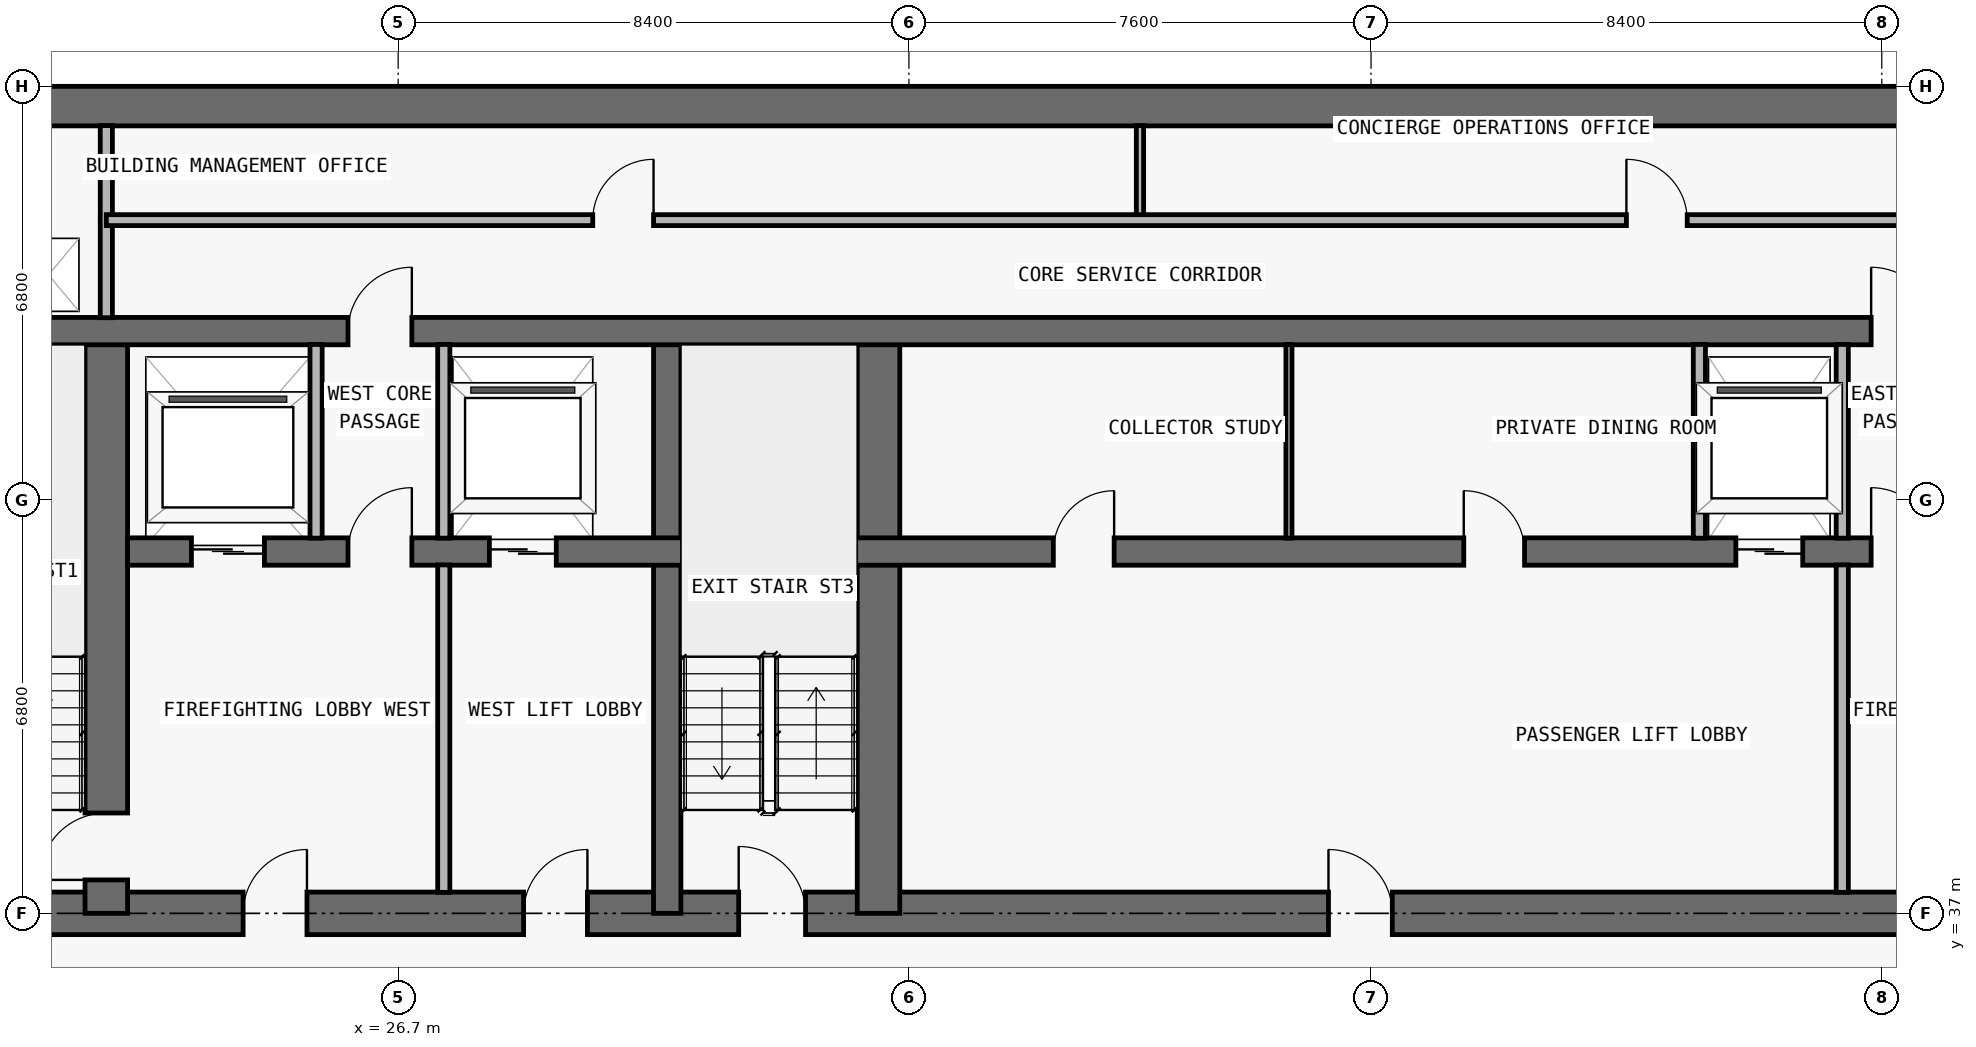
"""IFC4 building model, lengths in metres.
Left out: names, types, materials, properties, quantities, classifications, styles, units other than length and angle.
Written with IfcOpenShell. Run it as: python <this file> out.ifc"""

import sys

from ifc_helpers import new_model, si_unit, direction, frame, frame_2d, origin, place, context, subcontext, project, spatial, rectangle, extrude, element, fill, save


model = new_model("IFC4")
c1 = context("Model", 3, precision=1e-05, world=origin(), true_north=direction((0.0, 1.0)))
c2 = subcontext(c1, "Body", "Model", "MODEL_VIEW")
j1 = project(units=[si_unit("LENGTHUNIT", "METRE"), si_unit("PLANEANGLEUNIT", "RADIAN")], contexts=[c1])
p1 = place(None, origin())
s1 = spatial("IfcSite", under=j1, at=p1, CompositionType="ELEMENT")
p2 = place(p1, origin())
s2 = spatial("IfcBuilding", under=s1, at=p2, CompositionType="ELEMENT")
p3 = place(p2, frame((0.0, 0.0, 198.3)))
s3 = spatial("IfcBuildingStorey", under=s2, at=p3, CompositionType="ELEMENT", Elevation=198.3)
p4 = place(p3, frame((17.95, 37.0, 0.0), z_axis=(0.0, 0.0, 1.0), x_axis=(1.0, 0.0, 0.0)))
e1 = element("IfcWall", 1, at=p4, inside=s3, PredefinedType="SHEAR", context=c2, shape_type="SweptSolid", body=[
    extrude(rectangle(XDim=41.9, YDim=0.7, at=frame_2d((20.95, 0.0))), origin(), (0.0, 0.0, 1.0), 3.05),
])
p5 = place(p4, frame((14.35, 0.0, 0.0)))
e2 = element("IfcOpeningElement", 2, at=p5, cuts=e1, PredefinedType="OPENING", context=c2, shape_type="SweptSolid", body=[
    extrude(rectangle(XDim=1.1, YDim=2.15, at=frame_2d((0.55, 1.075))), frame((0.0, 0.36, 0.0), z_axis=(0.0, -1.0, 0.0), x_axis=(1.0, 0.0, 0.0)), (0.0, 0.0, 1.0), 0.72),
])
p6 = place(p4, frame((6.2, 0.0, 0.0)))
e3 = element("IfcOpeningElement", 3, at=p6, cuts=e1, PredefinedType="OPENING", context=c2, shape_type="SweptSolid", body=[
    extrude(rectangle(XDim=1.05, YDim=2.15, at=frame_2d((0.525, 1.075))), frame((0.0, 0.36, 0.0), z_axis=(0.0, -1.0, 0.0), x_axis=(1.0, 0.0, 0.0)), (0.0, 0.0, 1.0), 0.72),
])
p7 = place(p4, frame((34.7, 0.0, 0.0)))
e4 = element("IfcOpeningElement", 4, at=p7, cuts=e1, PredefinedType="OPENING", context=c2, shape_type="SweptSolid", body=[
    extrude(rectangle(XDim=1.05, YDim=2.15, at=frame_2d((0.525, 1.075))), frame((0.0, 0.36, 0.0), z_axis=(0.0, -1.0, 0.0), x_axis=(1.0, 0.0, 0.0)), (0.0, 0.0, 1.0), 0.72),
])
p8 = place(p4, frame((10.812, 0.0, 0.0)))
e5 = element("IfcOpeningElement", 5, at=p8, cuts=e1, PredefinedType="OPENING", context=c2, shape_type="SweptSolid", body=[
    extrude(rectangle(XDim=1.05, YDim=2.15, at=frame_2d((0.525, 1.075))), frame((0.0, 0.36, 0.0), z_axis=(0.0, -1.0, 0.0), x_axis=(1.0, 0.0, 0.0)), (0.0, 0.0, 1.0), 0.72),
])
p9 = place(p4, frame((24.05, 0.0, 0.0)))
e6 = element("IfcOpeningElement", 6, at=p9, cuts=e1, PredefinedType="OPENING", context=c2, shape_type="SweptSolid", body=[
    extrude(rectangle(XDim=1.05, YDim=2.15, at=frame_2d((0.525, 1.075))), frame((0.0, 0.36, 0.0), z_axis=(0.0, -1.0, 0.0), x_axis=(1.0, 0.0, 0.0)), (0.0, 0.0, 1.0), 0.72),
])
p10 = place(p3, frame((17.95, 50.275, 0.0), z_axis=(0.0, 0.0, 1.0), x_axis=(1.0, 0.0, 0.0)))
e7 = element("IfcWall", 7, at=p10, inside=s3, PredefinedType="SHEAR", context=c2, shape_type="SweptSolid", body=[
    extrude(rectangle(XDim=41.9, YDim=0.65, at=frame_2d((20.95, 0.0))), origin(), (0.0, 0.0, 1.0), 3.05),
])
p11 = place(p3, frame((21.9, 37.0, 0.0), z_axis=(0.0, 0.0, 1.0), x_axis=(0.0, 1.0, 0.0)))
e8 = element("IfcWall", 8, at=p11, inside=s3, PredefinedType="SHEAR", context=c2, shape_type="SweptSolid", body=[
    extrude(rectangle(XDim=9.575, YDim=0.7, at=frame_2d((4.788, 0.0))), origin(), (0.0, 0.0, 1.0), 3.05),
])
p12 = place(p11, frame((0.55, 0.0, 0.0)))
e9 = element("IfcOpeningElement", 9, at=p12, cuts=e8, PredefinedType="OPENING", context=c2, shape_type="SweptSolid", body=[
    extrude(rectangle(XDim=1.1, YDim=2.15, at=frame_2d((0.55, 1.075))), frame((0.0, 0.36, 0.0), z_axis=(0.0, -1.0, 0.0), x_axis=(1.0, 0.0, 0.0)), (0.0, 0.0, 1.0), 0.72),
])
p13 = place(p3, frame((31.125, 37.0, 0.0), z_axis=(0.0, 0.0, 1.0), x_axis=(0.0, 1.0, 0.0)))
e10 = element("IfcWall", 10, at=p13, inside=s3, PredefinedType="SHEAR", context=c2, shape_type="SweptSolid", body=[
    extrude(rectangle(XDim=9.575, YDim=0.45, at=frame_2d((4.788, 0.0))), origin(), (0.0, 0.0, 1.0), 3.05),
])
p14 = place(p3, frame((34.6, 37.0, 0.0), z_axis=(0.0, 0.0, 1.0), x_axis=(0.0, 1.0, 0.0)))
e11 = element("IfcWall", 11, at=p14, inside=s3, PredefinedType="SHEAR", context=c2, shape_type="SweptSolid", body=[
    extrude(rectangle(XDim=9.575, YDim=0.7, at=frame_2d((4.788, 0.0))), origin(), (0.0, 0.0, 1.0), 3.05),
])
p15 = place(p3, frame((22.25, 42.95, 0.0), z_axis=(0.0, 0.0, 1.0), x_axis=(1.0, 0.0, 0.0)))
e12 = element("IfcWall", 12, at=p15, inside=s3, PredefinedType="SHEAR", context=c2, shape_type="SweptSolid", body=[
    extrude(rectangle(XDim=33.3, YDim=0.45, at=frame_2d((16.65, 0.0))), origin(), (0.0, 0.0, 1.0), 3.05),
])
p16 = place(p15, frame((1.05, 0.0, 0.0)))
e13 = element("IfcOpeningElement", 13, at=p16, cuts=e12, PredefinedType="OPENING", context=c2, shape_type="SweptSolid", body=[
    extrude(rectangle(XDim=1.2, YDim=2.2, at=frame_2d((0.6, 1.1))), frame((0.0, 0.235, 0.0), z_axis=(0.0, -1.0, 0.0), x_axis=(1.0, 0.0, 0.0)), (0.0, 0.0, 1.0), 0.47),
])
p17 = place(p15, frame((31.05, 0.0, 0.0)))
e14 = element("IfcOpeningElement", 14, at=p17, cuts=e12, PredefinedType="OPENING", context=c2, shape_type="SweptSolid", body=[
    extrude(rectangle(XDim=1.2, YDim=2.2, at=frame_2d((0.6, 1.1))), frame((0.0, 0.235, 0.0), z_axis=(0.0, -1.0, 0.0), x_axis=(1.0, 0.0, 0.0)), (0.0, 0.0, 1.0), 0.47),
])
p18 = place(p15, frame((26.45, 0.0, 0.0)))
e15 = element("IfcOpeningElement", 15, at=p18, cuts=e12, PredefinedType="OPENING", context=c2, shape_type="SweptSolid", body=[
    extrude(rectangle(XDim=1.1, YDim=2.2, at=frame_2d((0.55, 1.1))), frame((0.0, 0.235, 0.0), z_axis=(0.0, -1.0, 0.0), x_axis=(1.0, 0.0, 0.0)), (0.0, 0.0, 1.0), 0.47),
])
p19 = place(p15, frame((5.95, 0.0, 0.0)))
e16 = element("IfcOpeningElement", 16, at=p19, cuts=e12, PredefinedType="OPENING", context=c2, shape_type="SweptSolid", body=[
    extrude(rectangle(XDim=1.1, YDim=2.2, at=frame_2d((0.55, 1.1))), frame((0.0, 0.235, 0.0), z_axis=(0.0, -1.0, 0.0), x_axis=(1.0, 0.0, 0.0)), (0.0, 0.0, 1.0), 0.47),
])
p20 = place(p15, frame((3.625, 0.0, 0.0)))
e17 = element("IfcOpeningElement", 17, at=p20, cuts=e12, PredefinedType="OPENING", context=c2, shape_type="SweptSolid", body=[
    extrude(rectangle(XDim=1.05, YDim=2.15, at=frame_2d((0.525, 1.075))), frame((0.0, 0.235, 0.0), z_axis=(0.0, -1.0, 0.0), x_axis=(1.0, 0.0, 0.0)), (0.0, 0.0, 1.0), 0.47),
])
p21 = place(p15, frame((28.675, 0.0, 0.0)))
e18 = element("IfcOpeningElement", 18, at=p21, cuts=e12, PredefinedType="OPENING", context=c2, shape_type="SweptSolid", body=[
    extrude(rectangle(XDim=1.05, YDim=2.15, at=frame_2d((0.525, 1.075))), frame((0.0, 0.235, 0.0), z_axis=(0.0, -1.0, 0.0), x_axis=(1.0, 0.0, 0.0)), (0.0, 0.0, 1.0), 0.47),
])
p22 = place(p15, frame((15.225, 0.0, 0.0)))
e19 = element("IfcOpeningElement", 19, at=p22, cuts=e12, PredefinedType="OPENING", context=c2, shape_type="SweptSolid", body=[
    extrude(rectangle(XDim=1.0, YDim=2.2, at=frame_2d((0.5, 1.1))), frame((0.0, 0.235, 0.0), z_axis=(0.0, -1.0, 0.0), x_axis=(1.0, 0.0, 0.0)), (0.0, 0.0, 1.0), 0.47),
])
p23 = place(p15, frame((21.975, 0.0, 0.0)))
e20 = element("IfcOpeningElement", 20, at=p23, cuts=e12, PredefinedType="OPENING", context=c2, shape_type="SweptSolid", body=[
    extrude(rectangle(XDim=1.0, YDim=2.2, at=frame_2d((0.5, 1.1))), frame((0.0, 0.235, 0.0), z_axis=(0.0, -1.0, 0.0), x_axis=(1.0, 0.0, 0.0)), (0.0, 0.0, 1.0), 0.47),
])
p24 = place(p3, frame((18.3, 46.575, 0.0), z_axis=(0.0, 0.0, 1.0), x_axis=(1.0, 0.0, 0.0)))
e21 = element("IfcWall", 21, at=p24, inside=s3, PredefinedType="SHEAR", context=c2, shape_type="SweptSolid", body=[
    extrude(rectangle(XDim=41.2, YDim=0.45, at=frame_2d((20.6, 0.0))), origin(), (0.0, 0.0, 1.0), 3.05),
])
p25 = place(p24, frame((7.575, 0.0, 0.0)))
e22 = element("IfcOpeningElement", 22, at=p25, cuts=e21, PredefinedType="OPENING", context=c2, shape_type="SweptSolid", body=[
    extrude(rectangle(XDim=1.05, YDim=2.15, at=frame_2d((0.525, 1.075))), frame((0.0, 0.235, 0.0), z_axis=(0.0, -1.0, 0.0), x_axis=(1.0, 0.0, 0.0)), (0.0, 0.0, 1.0), 0.47),
])
p26 = place(p24, frame((32.625, 0.0, 0.0)))
e23 = element("IfcOpeningElement", 23, at=p26, cuts=e21, PredefinedType="OPENING", context=c2, shape_type="SweptSolid", body=[
    extrude(rectangle(XDim=1.05, YDim=2.15, at=frame_2d((0.525, 1.075))), frame((0.0, 0.235, 0.0), z_axis=(0.0, -1.0, 0.0), x_axis=(1.0, 0.0, 0.0)), (0.0, 0.0, 1.0), 0.47),
])
p27 = place(p3, frame((21.9, 46.795, 0.0), z_axis=(0.0, 0.0, 1.0), x_axis=(0.0, 1.0, 0.0)))
e24 = element("IfcWall", 24, at=p27, inside=s3, PredefinedType="PARTITIONING", context=c2, shape_type="SweptSolid", body=[
    extrude(rectangle(XDim=3.16, YDim=0.2, at=frame_2d((1.58, 0.0))), origin(), (0.0, 0.0, 1.0), 3.05),
])
p28 = place(p3, frame((25.35, 43.17, 0.0), z_axis=(0.0, 0.0, 1.0), x_axis=(0.0, 1.0, 0.0)))
e25 = element("IfcWall", 25, at=p28, inside=s3, PredefinedType="PARTITIONING", context=c2, shape_type="SweptSolid", body=[
    extrude(rectangle(XDim=3.185, YDim=0.2, at=frame_2d((1.593, 0.0))), origin(), (0.0, 0.0, 1.0), 3.05),
])
p29 = place(p3, frame((27.45, 37.345, 0.0), z_axis=(0.0, 0.0, 1.0), x_axis=(0.0, 1.0, 0.0)))
e26 = element("IfcWall", 26, at=p29, inside=s3, PredefinedType="PARTITIONING", context=c2, shape_type="SweptSolid", body=[
    extrude(rectangle(XDim=5.385, YDim=0.2, at=frame_2d((2.692, 0.0))), origin(), (0.0, 0.0, 1.0), 3.05),
])
p30 = place(p3, frame((27.45, 43.17, 0.0), z_axis=(0.0, 0.0, 1.0), x_axis=(0.0, 1.0, 0.0)))
e27 = element("IfcWall", 27, at=p30, inside=s3, PredefinedType="PARTITIONING", context=c2, shape_type="SweptSolid", body=[
    extrude(rectangle(XDim=3.185, YDim=0.2, at=frame_2d((1.593, 0.0))), origin(), (0.0, 0.0, 1.0), 3.05),
])
p31 = place(p3, frame((38.9, 48.4, 0.0), z_axis=(0.0, 0.0, 1.0), x_axis=(0.0, 1.0, 0.0)))
e28 = element("IfcWall", 28, at=p31, inside=s3, PredefinedType="PARTITIONING", context=c2, shape_type="SweptSolid", body=[
    extrude(rectangle(XDim=1.555, YDim=0.12, at=frame_2d((0.778, 0.0))), origin(), (0.0, 0.0, 1.0), 3.05),
])
p32 = place(p3, frame((41.35, 43.17, 0.0), z_axis=(0.0, 0.0, 1.0), x_axis=(0.0, 1.0, 0.0)))
e29 = element("IfcWall", 29, at=p32, inside=s3, PredefinedType="MOVABLE", context=c2, shape_type="SweptSolid", body=[
    extrude(rectangle(XDim=3.185, YDim=0.1, at=frame_2d((1.593, 0.0))), origin(), (0.0, 0.0, 1.0), 3.05),
])
p33 = place(p3, frame((48.1, 43.17, 0.0), z_axis=(0.0, 0.0, 1.0), x_axis=(0.0, 1.0, 0.0)))
e30 = element("IfcWall", 30, at=p33, inside=s3, PredefinedType="PARTITIONING", context=c2, shape_type="SweptSolid", body=[
    extrude(rectangle(XDim=3.185, YDim=0.2, at=frame_2d((1.593, 0.0))), origin(), (0.0, 0.0, 1.0), 3.05),
])
p34 = place(p3, frame((50.45, 37.345, 0.0), z_axis=(0.0, 0.0, 1.0), x_axis=(0.0, 1.0, 0.0)))
e31 = element("IfcWall", 31, at=p34, inside=s3, PredefinedType="PARTITIONING", context=c2, shape_type="SweptSolid", body=[
    extrude(rectangle(XDim=5.385, YDim=0.2, at=frame_2d((2.692, 0.0))), origin(), (0.0, 0.0, 1.0), 3.05),
])
p35 = place(p3, frame((50.45, 43.17, 0.0), z_axis=(0.0, 0.0, 1.0), x_axis=(0.0, 1.0, 0.0)))
e32 = element("IfcWall", 32, at=p35, inside=s3, PredefinedType="PARTITIONING", context=c2, shape_type="SweptSolid", body=[
    extrude(rectangle(XDim=3.185, YDim=0.2, at=frame_2d((1.593, 0.0))), origin(), (0.0, 0.0, 1.0), 3.05),
])
p36 = place(p3, frame((21.9, 48.4, 0.0), z_axis=(0.0, 0.0, 1.0), x_axis=(1.0, 0.0, 0.0)))
e33 = element("IfcWall", 33, at=p36, inside=s3, PredefinedType="PARTITIONING", context=c2, shape_type="SweptSolid", body=[
    extrude(rectangle(XDim=34.0, YDim=0.18, at=frame_2d((17.0, 0.0))), origin(), (0.0, 0.0, 1.0), 3.05),
])
p37 = place(p36, frame((8.0, 0.0, 0.0)))
e34 = element("IfcOpeningElement", 34, at=p37, cuts=e33, PredefinedType="OPENING", context=c2, shape_type="SweptSolid", body=[
    extrude(rectangle(XDim=1.0, YDim=2.2, at=frame_2d((0.5, 1.1))), frame((0.0, 0.1, 0.0), z_axis=(0.0, -1.0, 0.0), x_axis=(1.0, 0.0, 0.0)), (0.0, 0.0, 1.0), 0.2),
])
p38 = place(p36, frame((25.0, 0.0, 0.0)))
e35 = element("IfcOpeningElement", 35, at=p38, cuts=e33, PredefinedType="OPENING", context=c2, shape_type="SweptSolid", body=[
    extrude(rectangle(XDim=1.0, YDim=2.2, at=frame_2d((0.5, 1.1))), frame((0.0, 0.1, 0.0), z_axis=(0.0, -1.0, 0.0), x_axis=(1.0, 0.0, 0.0)), (0.0, 0.0, 1.0), 0.2),
])
p39 = place(p16, origin())
e36 = element("IfcDoor", 36, at=p39, inside=s3, OperationType="DOUBLE_DOOR_SLIDING", PredefinedType="DOOR", context=c2, shape_type="SweptSolid", body=[
    extrude(rectangle(XDim=1.2, YDim=2.2, at=frame_2d((0.6, 1.1))), frame((0.0, 0.025, 0.0), z_axis=(0.0, -1.0, 0.0), x_axis=(1.0, 0.0, 0.0)), (0.0, 0.0, 1.0), 0.05),
])
fill(e13, e36)
p40 = place(p18, origin())
e37 = element("IfcDoor", 37, at=p40, inside=s3, OperationType="DOUBLE_DOOR_SLIDING", PredefinedType="DOOR", context=c2, shape_type="SweptSolid", body=[
    extrude(rectangle(XDim=1.1, YDim=2.2, at=frame_2d((0.55, 1.1))), frame((0.0, 0.025, 0.0), z_axis=(0.0, -1.0, 0.0), x_axis=(1.0, 0.0, 0.0)), (0.0, 0.0, 1.0), 0.05),
])
fill(e15, e37)
p41 = place(p19, origin())
e38 = element("IfcDoor", 38, at=p41, inside=s3, OperationType="DOUBLE_DOOR_SLIDING", PredefinedType="DOOR", context=c2, shape_type="SweptSolid", body=[
    extrude(rectangle(XDim=1.1, YDim=2.2, at=frame_2d((0.55, 1.1))), frame((0.0, 0.025, 0.0), z_axis=(0.0, -1.0, 0.0), x_axis=(1.0, 0.0, 0.0)), (0.0, 0.0, 1.0), 0.05),
])
fill(e16, e38)
p42 = place(p5, origin())
e39 = element("IfcDoor", 39, at=p42, inside=s3, OperationType="SINGLE_SWING_LEFT", PredefinedType="DOOR", context=c2, shape_type="SweptSolid", body=[
    extrude(rectangle(XDim=1.1, YDim=2.15, at=frame_2d((0.55, 1.075))), frame((0.0, 0.025, 0.0), z_axis=(0.0, -1.0, 0.0), x_axis=(1.0, 0.0, 0.0)), (0.0, 0.0, 1.0), 0.05),
])
fill(e2, e39)
p43 = place(p6, origin())
e40 = element("IfcDoor", 40, at=p43, inside=s3, OperationType="SINGLE_SWING_RIGHT", PredefinedType="DOOR", context=c2, shape_type="SweptSolid", body=[
    extrude(rectangle(XDim=1.05, YDim=2.15, at=frame_2d((0.525, 1.075))), frame((0.0, 0.025, 0.0), z_axis=(0.0, -1.0, 0.0), x_axis=(1.0, 0.0, 0.0)), (0.0, 0.0, 1.0), 0.05),
])
fill(e3, e40)
p44 = place(p12, origin())
e41 = element("IfcDoor", 41, at=p44, inside=s3, OperationType="SINGLE_SWING_LEFT", PredefinedType="DOOR", context=c2, shape_type="SweptSolid", body=[
    extrude(rectangle(XDim=1.1, YDim=2.15, at=frame_2d((0.55, 1.075))), frame((0.0, 0.025, 0.0), z_axis=(0.0, -1.0, 0.0), x_axis=(1.0, 0.0, 0.0)), (0.0, 0.0, 1.0), 0.05),
])
fill(e9, e41)
p45 = place(p20, origin())
e42 = element("IfcDoor", 42, at=p45, inside=s3, OperationType="SINGLE_SWING_RIGHT", PredefinedType="DOOR", context=c2, shape_type="SweptSolid", body=[
    extrude(rectangle(XDim=1.05, YDim=2.15, at=frame_2d((0.525, 1.075))), frame((0.0, 0.025, 0.0), z_axis=(0.0, -1.0, 0.0), x_axis=(1.0, 0.0, 0.0)), (0.0, 0.0, 1.0), 0.05),
])
fill(e17, e42)
p46 = place(p21, origin())
e43 = element("IfcDoor", 43, at=p46, inside=s3, OperationType="SINGLE_SWING_LEFT", PredefinedType="DOOR", context=c2, shape_type="SweptSolid", body=[
    extrude(rectangle(XDim=1.05, YDim=2.15, at=frame_2d((0.525, 1.075))), frame((0.0, 0.025, 0.0), z_axis=(0.0, -1.0, 0.0), x_axis=(1.0, 0.0, 0.0)), (0.0, 0.0, 1.0), 0.05),
])
fill(e18, e43)
p47 = place(p8, origin())
e44 = element("IfcDoor", 44, at=p47, inside=s3, OperationType="SINGLE_SWING_RIGHT", PredefinedType="DOOR", context=c2, shape_type="SweptSolid", body=[
    extrude(rectangle(XDim=1.05, YDim=2.15, at=frame_2d((0.525, 1.075))), frame((0.0, 0.025, 0.0), z_axis=(0.0, -1.0, 0.0), x_axis=(1.0, 0.0, 0.0)), (0.0, 0.0, 1.0), 0.05),
])
fill(e5, e44)
p48 = place(p9, origin())
e45 = element("IfcDoor", 45, at=p48, inside=s3, OperationType="SINGLE_SWING_LEFT", PredefinedType="DOOR", context=c2, shape_type="SweptSolid", body=[
    extrude(rectangle(XDim=1.05, YDim=2.15, at=frame_2d((0.525, 1.075))), frame((0.0, 0.025, 0.0), z_axis=(0.0, -1.0, 0.0), x_axis=(1.0, 0.0, 0.0)), (0.0, 0.0, 1.0), 0.05),
])
fill(e6, e45)
p49 = place(p22, origin())
e46 = element("IfcDoor", 46, at=p49, inside=s3, OperationType="SINGLE_SWING_RIGHT", PredefinedType="DOOR", context=c2, shape_type="SweptSolid", body=[
    extrude(rectangle(XDim=1.0, YDim=2.2, at=frame_2d((0.5, 1.1))), frame((0.0, 0.025, 0.0), z_axis=(0.0, -1.0, 0.0), x_axis=(1.0, 0.0, 0.0)), (0.0, 0.0, 1.0), 0.05),
])
fill(e19, e46)
p50 = place(p23, origin())
e47 = element("IfcDoor", 47, at=p50, inside=s3, OperationType="SINGLE_SWING_LEFT", PredefinedType="DOOR", context=c2, shape_type="SweptSolid", body=[
    extrude(rectangle(XDim=1.0, YDim=2.2, at=frame_2d((0.5, 1.1))), frame((0.0, 0.025, 0.0), z_axis=(0.0, -1.0, 0.0), x_axis=(1.0, 0.0, 0.0)), (0.0, 0.0, 1.0), 0.05),
])
fill(e20, e47)
p51 = place(p25, origin())
e48 = element("IfcDoor", 48, at=p51, inside=s3, OperationType="SINGLE_SWING_RIGHT", PredefinedType="DOOR", context=c2, shape_type="SweptSolid", body=[
    extrude(rectangle(XDim=1.05, YDim=2.15, at=frame_2d((0.525, 1.075))), frame((0.0, 0.025, 0.0), z_axis=(0.0, -1.0, 0.0), x_axis=(1.0, 0.0, 0.0)), (0.0, 0.0, 1.0), 0.05),
])
fill(e22, e48)
p52 = place(p26, origin())
e49 = element("IfcDoor", 49, at=p52, inside=s3, OperationType="SINGLE_SWING_LEFT", PredefinedType="DOOR", context=c2, shape_type="SweptSolid", body=[
    extrude(rectangle(XDim=1.05, YDim=2.15, at=frame_2d((0.525, 1.075))), frame((0.0, 0.025, 0.0), z_axis=(0.0, -1.0, 0.0), x_axis=(1.0, 0.0, 0.0)), (0.0, 0.0, 1.0), 0.05),
])
fill(e23, e49)
p53 = place(p37, origin())
e50 = element("IfcDoor", 50, at=p53, inside=s3, OperationType="SINGLE_SWING_RIGHT", PredefinedType="DOOR", context=c2, shape_type="SweptSolid", body=[
    extrude(rectangle(XDim=1.0, YDim=2.2, at=frame_2d((0.5, 1.1))), frame((0.0, 0.025, 0.0), z_axis=(0.0, -1.0, 0.0), x_axis=(1.0, 0.0, 0.0)), (0.0, 0.0, 1.0), 0.05),
])
fill(e34, e50)
p54 = place(p38, origin())
e51 = element("IfcDoor", 51, at=p54, inside=s3, OperationType="SINGLE_SWING_LEFT", PredefinedType="DOOR", context=c2, shape_type="SweptSolid", body=[
    extrude(rectangle(XDim=1.0, YDim=2.2, at=frame_2d((0.5, 1.1))), frame((0.0, 0.025, 0.0), z_axis=(0.0, -1.0, 0.0), x_axis=(1.0, 0.0, 0.0)), (0.0, 0.0, 1.0), 0.05),
])
fill(e35, e51)
save(model, sys.argv[1])
